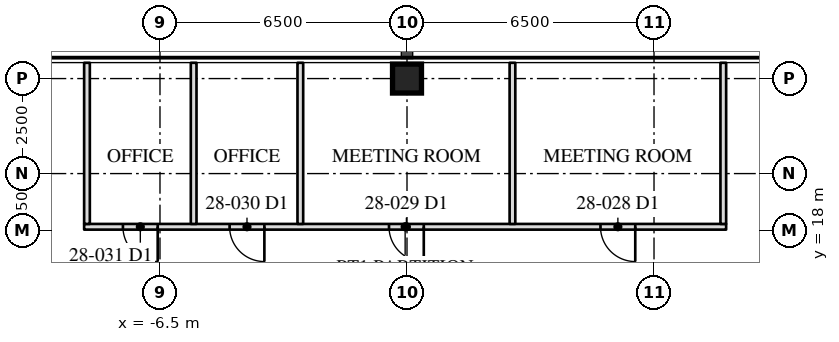
"""IFC4 building model, lengths in metres.
Left out: names, types, materials, properties, quantities, classifications, styles, units other than length and angle.
Written with IfcOpenShell. Run it as: python <this file> out.ifc"""

import sys

from ifc_helpers import new_model, si_unit, direction, frame, frame_2d, origin, origin_2d, place, context, subcontext, project, spatial, rectangle, hollow_rectangle, extrude, element, fill, save


model = new_model("IFC4")
c1 = context("Model", 3, precision=1e-05, world=origin(), true_north=direction((0.0, 1.0)))
c2 = subcontext(c1, "Body", "Model", "MODEL_VIEW")
j1 = project(units=[si_unit("LENGTHUNIT", "METRE"), si_unit("PLANEANGLEUNIT", "RADIAN")], contexts=[c1])
p1 = place(None, origin())
s1 = spatial("IfcSite", under=j1, at=p1, CompositionType="ELEMENT")
p2 = place(p1, origin())
s2 = spatial("IfcBuilding", under=s1, at=p2, CompositionType="ELEMENT")
p3 = place(p2, frame((0.0, 0.0, 121.3)))
s3 = spatial("IfcBuildingStorey", under=s2, at=p3, CompositionType="ELEMENT", Elevation=121.3)
p4 = place(p3, frame((0.0, 22.0, 0.0), z_axis=(0.0, 0.0, 1.0), x_axis=(1.0, 0.0, 0.0)))
e1 = element("IfcColumn", 1, at=p4, inside=s3, PredefinedType="COLUMN", context=c2, shape_type="SweptSolid", body=[
    extrude(hollow_rectangle(XDim=0.762, YDim=0.762, WallThickness=0.127, at=origin_2d()), origin(), (0.0, 0.0, 1.0), 4.1),
])
p5 = place(p3, frame((8.398, 18.1, 0.0), z_axis=(0.0, 0.0, 1.0), x_axis=(-1.0, 0.0, 0.0)))
e2 = element("IfcWall", 2, at=p5, inside=s3, PredefinedType="PARTITIONING", context=c2, shape_type="SweptSolid", body=[
    extrude(rectangle(XDim=16.894, YDim=0.15, at=frame_2d((8.447, 0.0))), origin(), (0.0, 0.0, 1.0), 3.91),
])
p6 = place(p5, frame((2.392, 0.0, 0.0)))
e3 = element("IfcOpeningElement", 3, at=p6, cuts=e2, PredefinedType="OPENING", context=c2, shape_type="SweptSolid", body=[
    extrude(rectangle(XDim=0.915, YDim=2.134, at=frame_2d((0.458, 1.067))), frame((0.0, 0.085, 0.0), z_axis=(0.0, -1.0, 0.0), x_axis=(1.0, 0.0, 0.0)), (0.0, 0.0, 1.0), 0.17),
])
p7 = place(p5, frame((7.957, 0.0, 0.0)))
e4 = element("IfcOpeningElement", 4, at=p7, cuts=e2, PredefinedType="OPENING", context=c2, shape_type="SweptSolid", body=[
    extrude(rectangle(XDim=0.915, YDim=2.134, at=frame_2d((0.458, 1.067))), frame((0.0, 0.085, 0.0), z_axis=(0.0, -1.0, 0.0), x_axis=(1.0, 0.0, 0.0)), (0.0, 0.0, 1.0), 0.17),
])
p8 = place(p5, frame((12.151, 0.0, 0.0)))
e5 = element("IfcOpeningElement", 5, at=p8, cuts=e2, PredefinedType="OPENING", context=c2, shape_type="SweptSolid", body=[
    extrude(rectangle(XDim=0.915, YDim=2.134, at=frame_2d((0.458, 1.067))), frame((0.0, 0.085, 0.0), z_axis=(0.0, -1.0, 0.0), x_axis=(1.0, 0.0, 0.0)), (0.0, 0.0, 1.0), 0.17),
])
p9 = place(p5, frame((14.958, 0.0, 0.0)))
e6 = element("IfcOpeningElement", 6, at=p9, cuts=e2, PredefinedType="OPENING", context=c2, shape_type="SweptSolid", body=[
    extrude(rectangle(XDim=0.915, YDim=2.134, at=frame_2d((0.458, 1.067))), frame((0.0, 0.085, 0.0), z_axis=(0.0, -1.0, 0.0), x_axis=(1.0, 0.0, 0.0)), (0.0, 0.0, 1.0), 0.17),
])
for number, where, z_axis, x_axis in (
    (7, (8.323, 18.175, 0.0), (0.0, 0.0, 1.0), (0.0, 1.0, 0.0)),
    (8, (2.775, 18.175, 0.0), (0.0, 0.0, 1.0), (0.0, 1.0, 0.0)),
    (9, (-2.807, 18.175, 0.0), (0.0, 0.0, 1.0), (0.0, 1.0, 0.0)),
    (10, (-5.614, 18.175, 0.0), (0.0, 0.0, 1.0), (0.0, 1.0, 0.0)),
    (11, (-8.421, 18.175, 0.0), (0.0, 0.0, 1.0), (0.0, 1.0, 0.0)),
):
    element("IfcWall", number, at=place(p3, frame(where, z_axis=z_axis, x_axis=x_axis)), inside=s3, PredefinedType="PARTITIONING", context=c2, shape_type="SweptSolid", body=[
        extrude(rectangle(XDim=4.24, YDim=0.15, at=frame_2d((2.12, 0.0))), origin(), (0.0, 0.0, 1.0), 3.91),
    ])
p10 = place(p6, origin())
e12 = element("IfcDoor", 12, at=p10, inside=s3, OperationType="SINGLE_SWING_LEFT", PredefinedType="DOOR", context=c2, shape_type="SweptSolid", body=[
    extrude(rectangle(XDim=0.915, YDim=2.134, at=frame_2d((0.458, 1.067))), frame((0.0, 0.025, 0.0), z_axis=(0.0, -1.0, 0.0), x_axis=(1.0, 0.0, 0.0)), (0.0, 0.0, 1.0), 0.05),
])
fill(e3, e12)
p11 = place(p7, origin())
e13 = element("IfcDoor", 13, at=p11, inside=s3, OperationType="SINGLE_SWING_LEFT", PredefinedType="DOOR", context=c2, shape_type="SweptSolid", body=[
    extrude(rectangle(XDim=0.915, YDim=2.134, at=frame_2d((0.458, 1.067))), frame((0.0, 0.025, 0.0), z_axis=(0.0, -1.0, 0.0), x_axis=(1.0, 0.0, 0.0)), (0.0, 0.0, 1.0), 0.05),
])
fill(e4, e13)
p12 = place(p8, origin())
e14 = element("IfcDoor", 14, at=p12, inside=s3, OperationType="SINGLE_SWING_LEFT", PredefinedType="DOOR", context=c2, shape_type="SweptSolid", body=[
    extrude(rectangle(XDim=0.915, YDim=2.134, at=frame_2d((0.458, 1.067))), frame((0.0, 0.025, 0.0), z_axis=(0.0, -1.0, 0.0), x_axis=(1.0, 0.0, 0.0)), (0.0, 0.0, 1.0), 0.05),
])
fill(e5, e14)
p13 = place(p9, origin())
e15 = element("IfcDoor", 15, at=p13, inside=s3, OperationType="SINGLE_SWING_LEFT", PredefinedType="DOOR", context=c2, shape_type="SweptSolid", body=[
    extrude(rectangle(XDim=0.915, YDim=2.134, at=frame_2d((0.458, 1.067))), frame((0.0, 0.025, 0.0), z_axis=(0.0, -1.0, 0.0), x_axis=(1.0, 0.0, 0.0)), (0.0, 0.0, 1.0), 0.05),
])
fill(e6, e15)
save(model, sys.argv[1])
